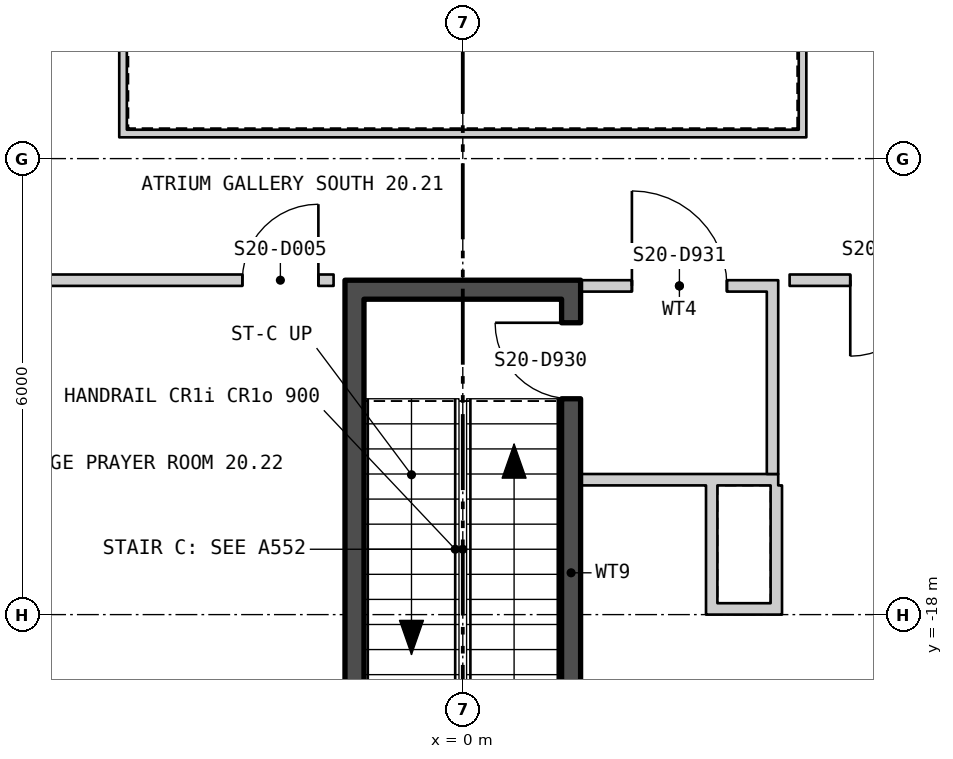
"""IFC4 building model, lengths in metres.
Left out: names, types, materials, properties, quantities, classifications, styles, units other than length and angle.
Written with IfcOpenShell. Run it as: python <this file> out.ifc"""

import sys

from ifc_helpers import new_model, si_unit, direction, frame, frame_2d, origin, place, context, subcontext, project, spatial, polyline, rectangle, outline, extrude, element, fill, save


model = new_model("IFC4")
c1 = context("Model", 3, precision=1e-05, world=origin(), true_north=direction((0.0, 1.0)))
c2 = subcontext(c1, "Body", "Model", "MODEL_VIEW")
j1 = project(units=[si_unit("LENGTHUNIT", "METRE"), si_unit("PLANEANGLEUNIT", "RADIAN")], contexts=[c1])
p1 = place(None, origin())
s1 = spatial("IfcSite", under=j1, at=p1, CompositionType="ELEMENT")
p2 = place(p1, origin())
s2 = spatial("IfcBuilding", under=s1, at=p2, CompositionType="ELEMENT")
p3 = place(p2, frame((0.0, 0.0, 268.8)))
s3 = spatial("IfcBuildingStorey", under=s2, at=p3, CompositionType="ELEMENT", Elevation=268.8)
p4 = place(p3, frame((-25.54, 15.35, -0.18), z_axis=(0.0, 0.0, 1.0), x_axis=(0.499999764979, -0.866025539474, 0.0)))
e1 = element("IfcWall", 1, at=p4, inside=s3, PredefinedType="SOLIDWALL", context=c2, shape_type="SweptSolid", body=[
    extrude(outline(polyline([(-0.13, -0.225), (45.87, -0.225), (45.61, 0.225), (0.13, 0.225), (-0.13, -0.225)])), origin(), (0.0, 0.0, 1.0), 3.68),
])
p5 = place(p4, frame((1.424, 0.0, 1.08)))
e2 = element("IfcOpeningElement", 2, at=p5, cuts=e1, PredefinedType="OPENING", context=c2, shape_type="SweptSolid", body=[
    extrude(rectangle(XDim=2.4, YDim=2.0, at=frame_2d((1.2, 1.0))), frame((0.0, 0.235, 0.0), z_axis=(0.0, -1.0, 0.0), x_axis=(1.0, 0.0, 0.0)), (0.0, 0.0, 1.0), 0.47),
])
p6 = place(p4, frame((5.893, 0.0, 1.08)))
e3 = element("IfcOpeningElement", 3, at=p6, cuts=e1, PredefinedType="OPENING", context=c2, shape_type="SweptSolid", body=[
    extrude(rectangle(XDim=2.4, YDim=2.0, at=frame_2d((1.2, 1.0))), frame((0.0, 0.235, 0.0), z_axis=(0.0, -1.0, 0.0), x_axis=(1.0, 0.0, 0.0)), (0.0, 0.0, 1.0), 0.47),
])
p7 = place(p4, frame((10.401, 0.0, 1.08)))
e4 = element("IfcOpeningElement", 4, at=p7, cuts=e1, PredefinedType="OPENING", context=c2, shape_type="SweptSolid", body=[
    extrude(rectangle(XDim=2.4, YDim=2.0, at=frame_2d((1.2, 1.0))), frame((0.0, 0.235, 0.0), z_axis=(0.0, -1.0, 0.0), x_axis=(1.0, 0.0, 0.0)), (0.0, 0.0, 1.0), 0.47),
])
p8 = place(p4, frame((14.909, 0.0, 1.08)))
e5 = element("IfcOpeningElement", 5, at=p8, cuts=e1, PredefinedType="OPENING", context=c2, shape_type="SweptSolid", body=[
    extrude(rectangle(XDim=2.4, YDim=2.0, at=frame_2d((1.2, 1.0))), frame((0.0, 0.235, 0.0), z_axis=(0.0, -1.0, 0.0), x_axis=(1.0, 0.0, 0.0)), (0.0, 0.0, 1.0), 0.47),
])
p9 = place(p4, frame((19.416, 0.0, 1.08)))
e6 = element("IfcOpeningElement", 6, at=p9, cuts=e1, PredefinedType="OPENING", context=c2, shape_type="SweptSolid", body=[
    extrude(rectangle(XDim=2.4, YDim=2.0, at=frame_2d((1.2, 1.0))), frame((0.0, 0.235, 0.0), z_axis=(0.0, -1.0, 0.0), x_axis=(1.0, 0.0, 0.0)), (0.0, 0.0, 1.0), 0.47),
])
p10 = place(p4, frame((23.924, 0.0, 1.08)))
e7 = element("IfcOpeningElement", 7, at=p10, cuts=e1, PredefinedType="OPENING", context=c2, shape_type="SweptSolid", body=[
    extrude(rectangle(XDim=2.4, YDim=2.0, at=frame_2d((1.2, 1.0))), frame((0.0, 0.235, 0.0), z_axis=(0.0, -1.0, 0.0), x_axis=(1.0, 0.0, 0.0)), (0.0, 0.0, 1.0), 0.47),
])
p11 = place(p4, frame((28.431, 0.0, 1.08)))
e8 = element("IfcOpeningElement", 8, at=p11, cuts=e1, PredefinedType="OPENING", context=c2, shape_type="SweptSolid", body=[
    extrude(rectangle(XDim=2.4, YDim=2.0, at=frame_2d((1.2, 1.0))), frame((0.0, 0.235, 0.0), z_axis=(0.0, -1.0, 0.0), x_axis=(1.0, 0.0, 0.0)), (0.0, 0.0, 1.0), 0.47),
])
p12 = place(p4, frame((32.939, 0.0, 1.08)))
e9 = element("IfcOpeningElement", 9, at=p12, cuts=e1, PredefinedType="OPENING", context=c2, shape_type="SweptSolid", body=[
    extrude(rectangle(XDim=2.4, YDim=2.0, at=frame_2d((1.2, 1.0))), frame((0.0, 0.235, 0.0), z_axis=(0.0, -1.0, 0.0), x_axis=(1.0, 0.0, 0.0)), (0.0, 0.0, 1.0), 0.47),
])
p13 = place(p4, frame((37.447, 0.0, 1.08)))
e10 = element("IfcOpeningElement", 10, at=p13, cuts=e1, PredefinedType="OPENING", context=c2, shape_type="SweptSolid", body=[
    extrude(rectangle(XDim=2.4, YDim=2.0, at=frame_2d((1.2, 1.0))), frame((0.0, 0.235, 0.0), z_axis=(0.0, -1.0, 0.0), x_axis=(1.0, 0.0, 0.0)), (0.0, 0.0, 1.0), 0.47),
])
p14 = place(p4, frame((41.916, 0.0, 1.08)))
e11 = element("IfcOpeningElement", 11, at=p14, cuts=e1, PredefinedType="OPENING", context=c2, shape_type="SweptSolid", body=[
    extrude(rectangle(XDim=2.4, YDim=2.0, at=frame_2d((1.2, 1.0))), frame((0.0, 0.235, 0.0), z_axis=(0.0, -1.0, 0.0), x_axis=(1.0, 0.0, 0.0)), (0.0, 0.0, 1.0), 0.47),
])
p15 = place(p3, frame((2.67, -24.262, -0.18), z_axis=(0.0, 0.0, 1.0), x_axis=(0.499999764979, 0.866025539474, 0.0)))
e12 = element("IfcWall", 12, at=p15, inside=s3, PredefinedType="SOLIDWALL", context=c2, shape_type="SweptSolid", body=[
    extrude(outline(polyline([(-0.13, -0.225), (45.87, -0.225), (45.61, 0.225), (0.13, 0.225), (-0.13, -0.225)])), origin(), (0.0, 0.0, 1.0), 3.68),
])
p16 = place(p15, frame((1.424, 0.0, 1.08)))
e13 = element("IfcOpeningElement", 13, at=p16, cuts=e12, PredefinedType="OPENING", context=c2, shape_type="SweptSolid", body=[
    extrude(rectangle(XDim=2.4, YDim=2.0, at=frame_2d((1.2, 1.0))), frame((0.0, 0.235, 0.0), z_axis=(0.0, -1.0, 0.0), x_axis=(1.0, 0.0, 0.0)), (0.0, 0.0, 1.0), 0.47),
])
p17 = place(p15, frame((5.893, 0.0, 1.08)))
e14 = element("IfcOpeningElement", 14, at=p17, cuts=e12, PredefinedType="OPENING", context=c2, shape_type="SweptSolid", body=[
    extrude(rectangle(XDim=2.4, YDim=2.0, at=frame_2d((1.2, 1.0))), frame((0.0, 0.235, 0.0), z_axis=(0.0, -1.0, 0.0), x_axis=(1.0, 0.0, 0.0)), (0.0, 0.0, 1.0), 0.47),
])
p18 = place(p15, frame((10.401, 0.0, 1.08)))
e15 = element("IfcOpeningElement", 15, at=p18, cuts=e12, PredefinedType="OPENING", context=c2, shape_type="SweptSolid", body=[
    extrude(rectangle(XDim=2.4, YDim=2.0, at=frame_2d((1.2, 1.0))), frame((0.0, 0.235, 0.0), z_axis=(0.0, -1.0, 0.0), x_axis=(1.0, 0.0, 0.0)), (0.0, 0.0, 1.0), 0.47),
])
p19 = place(p15, frame((14.909, 0.0, 1.08)))
e16 = element("IfcOpeningElement", 16, at=p19, cuts=e12, PredefinedType="OPENING", context=c2, shape_type="SweptSolid", body=[
    extrude(rectangle(XDim=2.4, YDim=2.0, at=frame_2d((1.2, 1.0))), frame((0.0, 0.235, 0.0), z_axis=(0.0, -1.0, 0.0), x_axis=(1.0, 0.0, 0.0)), (0.0, 0.0, 1.0), 0.47),
])
p20 = place(p15, frame((23.924, 0.0, 1.08)))
e17 = element("IfcOpeningElement", 17, at=p20, cuts=e12, PredefinedType="OPENING", context=c2, shape_type="SweptSolid", body=[
    extrude(rectangle(XDim=2.4, YDim=2.0, at=frame_2d((1.2, 1.0))), frame((0.0, 0.235, 0.0), z_axis=(0.0, -1.0, 0.0), x_axis=(1.0, 0.0, 0.0)), (0.0, 0.0, 1.0), 0.47),
])
p21 = place(p15, frame((28.431, 0.0, 1.08)))
e18 = element("IfcOpeningElement", 18, at=p21, cuts=e12, PredefinedType="OPENING", context=c2, shape_type="SweptSolid", body=[
    extrude(rectangle(XDim=2.4, YDim=2.0, at=frame_2d((1.2, 1.0))), frame((0.0, 0.235, 0.0), z_axis=(0.0, -1.0, 0.0), x_axis=(1.0, 0.0, 0.0)), (0.0, 0.0, 1.0), 0.47),
])
p22 = place(p15, frame((32.939, 0.0, 1.08)))
e19 = element("IfcOpeningElement", 19, at=p22, cuts=e12, PredefinedType="OPENING", context=c2, shape_type="SweptSolid", body=[
    extrude(rectangle(XDim=2.4, YDim=2.0, at=frame_2d((1.2, 1.0))), frame((0.0, 0.235, 0.0), z_axis=(0.0, -1.0, 0.0), x_axis=(1.0, 0.0, 0.0)), (0.0, 0.0, 1.0), 0.47),
])
p23 = place(p15, frame((37.447, 0.0, 1.08)))
e20 = element("IfcOpeningElement", 20, at=p23, cuts=e12, PredefinedType="OPENING", context=c2, shape_type="SweptSolid", body=[
    extrude(rectangle(XDim=2.4, YDim=2.0, at=frame_2d((1.2, 1.0))), frame((0.0, 0.235, 0.0), z_axis=(0.0, -1.0, 0.0), x_axis=(1.0, 0.0, 0.0)), (0.0, 0.0, 1.0), 0.47),
])
p24 = place(p15, frame((41.916, 0.0, 1.08)))
e21 = element("IfcOpeningElement", 21, at=p24, cuts=e12, PredefinedType="OPENING", context=c2, shape_type="SweptSolid", body=[
    extrude(rectangle(XDim=2.4, YDim=2.0, at=frame_2d((1.2, 1.0))), frame((0.0, 0.235, 0.0), z_axis=(0.0, -1.0, 0.0), x_axis=(1.0, 0.0, 0.0)), (0.0, 0.0, 1.0), 0.47),
])
p25 = place(p3, frame((-4.52, -11.67, 0.0), z_axis=(0.0, 0.0, 1.0), x_axis=(1.0, 0.0, 0.0)))
e22 = element("IfcWall", 22, at=p25, inside=s3, PredefinedType="PARTITIONING", context=c2, shape_type="SweptSolid", body=[
    extrude(rectangle(XDim=9.04, YDim=0.1, at=frame_2d((4.52, 0.0))), origin(), (0.0, 0.0, 1.0), 3.7),
])
for number, where, z_axis, x_axis in (
    (23, (4.47, -11.62, 0.0), (0.0, 0.0, 1.0), (0.0, 1.0, 0.0)),
    (24, (-4.47, -3.58, 0.0), (0.0, 0.0, 1.0), (0.0, -1.0, 0.0)),
):
    element("IfcWall", number, at=place(p3, frame(where, z_axis=z_axis, x_axis=x_axis)), inside=s3, PredefinedType="PARTITIONING", context=c2, shape_type="SweptSolid", body=[
        extrude(rectangle(XDim=8.04, YDim=0.1, at=frame_2d((4.02, 0.0))), origin(), (0.0, 0.0, 1.0), 3.7),
    ])
p26 = place(p3, frame((-1.425, -21.05, 0.0), z_axis=(0.0, 0.0, 1.0), x_axis=(0.0, 1.0, 0.0)))
e25 = element("IfcWall", 25, at=p26, inside=s3, PredefinedType="SHEAR", context=c2, shape_type="SweptSolid", body=[
    extrude(rectangle(XDim=7.2, YDim=0.25, at=frame_2d((3.6, 0.0))), origin(), (0.0, 0.0, 1.0), 3.7),
])
p27 = place(p3, frame((1.425, -21.05, 0.0), z_axis=(0.0, 0.0, 1.0), x_axis=(0.0, 1.0, 0.0)))
e26 = element("IfcWall", 26, at=p27, inside=s3, PredefinedType="SHEAR", context=c2, shape_type="SweptSolid", body=[
    extrude(rectangle(XDim=7.2, YDim=0.25, at=frame_2d((3.6, 0.0))), origin(), (0.0, 0.0, 1.0), 3.7),
])
p28 = place(p27, frame((5.89, 0.0, 0.0)))
e27 = element("IfcOpeningElement", 27, at=p28, cuts=e26, PredefinedType="OPENING", context=c2, shape_type="SweptSolid", body=[
    extrude(rectangle(XDim=1.0, YDim=2.1, at=frame_2d((0.5, 1.05))), frame((0.0, 0.135, 0.0), z_axis=(0.0, -1.0, 0.0), x_axis=(1.0, 0.0, 0.0)), (0.0, 0.0, 1.0), 0.27),
])
p29 = place(p3, frame((-1.55, -13.725, 0.0), z_axis=(0.0, 0.0, 1.0), x_axis=(1.0, 0.0, 0.0)))
e28 = element("IfcWall", 28, at=p29, inside=s3, PredefinedType="SHEAR", context=c2, shape_type="SweptSolid", body=[
    extrude(rectangle(XDim=3.1, YDim=0.25, at=frame_2d((1.55, 0.0))), origin(), (0.0, 0.0, 1.0), 3.7),
])
p30 = place(p3, frame((1.55, -16.225, 0.0), z_axis=(0.0, 0.0, 1.0), x_axis=(1.0, 0.0, 0.0)))
e29 = element("IfcWall", 29, at=p30, inside=s3, PredefinedType="PARTITIONING", context=c2, shape_type="SweptSolid", body=[
    extrude(rectangle(XDim=2.6, YDim=0.15, at=frame_2d((1.3, 0.0))), origin(), (0.0, 0.0, 1.0), 3.7),
])
p31 = place(p3, frame((4.075, -16.15, 0.0), z_axis=(0.0, 0.0, 1.0), x_axis=(0.0, 1.0, 0.0)))
e30 = element("IfcWall", 30, at=p31, inside=s3, PredefinedType="PARTITIONING", context=c2, shape_type="SweptSolid", body=[
    extrude(rectangle(XDim=2.4, YDim=0.15, at=frame_2d((1.2, 0.0))), origin(), (0.0, 0.0, 1.0), 3.7),
])
p32 = place(p3, frame((1.55, -13.675, 0.0), z_axis=(0.0, 0.0, 1.0), x_axis=(1.0, 0.0, 0.0)))
e31 = element("IfcWall", 31, at=p32, inside=s3, PredefinedType="PARTITIONING", context=c2, shape_type="SweptSolid", body=[
    extrude(rectangle(XDim=2.6, YDim=0.15, at=frame_2d((1.3, 0.0))), origin(), (0.0, 0.0, 1.0), 2.79),
])
p33 = place(p32, frame((0.675, 0.0, 0.0)))
e32 = element("IfcOpeningElement", 32, at=p33, cuts=e31, PredefinedType="OPENING", context=c2, shape_type="SweptSolid", body=[
    extrude(rectangle(XDim=1.25, YDim=2.1, at=frame_2d((0.625, 1.05))), frame((0.0, 0.085, 0.0), z_axis=(0.0, -1.0, 0.0), x_axis=(1.0, 0.0, 0.0)), (0.0, 0.0, 1.0), 0.17),
])
p34 = place(p3, frame((3.275, -18.0, 0.0), z_axis=(0.0, 0.0, 1.0), x_axis=(0.0, 1.0, 0.0)))
e33 = element("IfcWall", 33, at=p34, inside=s3, PredefinedType="PARTITIONING", context=c2, shape_type="SweptSolid", body=[
    extrude(rectangle(XDim=1.7, YDim=0.15, at=frame_2d((0.85, 0.0))), origin(), (0.0, 0.0, 1.0), 3.2),
])
p35 = place(p3, frame((3.35, -17.925, 0.0), z_axis=(0.0, 0.0, 1.0), x_axis=(1.0, 0.0, 0.0)))
e34 = element("IfcWall", 34, at=p35, inside=s3, PredefinedType="PARTITIONING", context=c2, shape_type="SweptSolid", body=[
    extrude(rectangle(XDim=0.7, YDim=0.15, at=frame_2d((0.35, 0.0))), origin(), (0.0, 0.0, 1.0), 3.7),
])
p36 = place(p3, frame((4.125, -18.0, 0.0), z_axis=(0.0, 0.0, 1.0), x_axis=(0.0, 1.0, 0.0)))
e35 = element("IfcWall", 35, at=p36, inside=s3, PredefinedType="PARTITIONING", context=c2, shape_type="SweptSolid", body=[
    extrude(rectangle(XDim=1.7, YDim=0.15, at=frame_2d((0.85, 0.0))), origin(), (0.0, 0.0, 1.0), 3.7),
])
p37 = place(p3, frame((-7.725, -13.6, 0.0), z_axis=(0.0, 0.0, 1.0), x_axis=(1.0, 0.0, 0.0)))
e36 = element("IfcWall", 36, at=p37, inside=s3, PredefinedType="PARTITIONING", context=c2, shape_type="SweptSolid", body=[
    extrude(rectangle(XDim=6.025, YDim=0.15, at=frame_2d((3.013, 0.0))), origin(), (0.0, 0.0, 1.0), 2.79),
])
p38 = place(p37, frame((4.825, 0.0, 0.0)))
e37 = element("IfcOpeningElement", 37, at=p38, cuts=e36, PredefinedType="OPENING", context=c2, shape_type="SweptSolid", body=[
    extrude(rectangle(XDim=1.0, YDim=2.1, at=frame_2d((0.5, 1.05))), frame((0.0, 0.085, 0.0), z_axis=(0.0, -1.0, 0.0), x_axis=(1.0, 0.0, 0.0)), (0.0, 0.0, 1.0), 0.17),
])
p39 = place(p3, frame((4.3, -13.6, 0.0), z_axis=(0.0, 0.0, 1.0), x_axis=(1.0, 0.0, 0.0)))
e38 = element("IfcWall", 38, at=p39, inside=s3, PredefinedType="PARTITIONING", context=c2, shape_type="SweptSolid", body=[
    extrude(rectangle(XDim=3.425, YDim=0.15, at=frame_2d((1.712, 0.0))), origin(), (0.0, 0.0, 1.0), 2.79),
])
p40 = place(p39, frame((0.798, 0.0, 0.0)))
e39 = element("IfcOpeningElement", 39, at=p40, cuts=e38, PredefinedType="OPENING", context=c2, shape_type="SweptSolid", body=[
    extrude(rectangle(XDim=1.0, YDim=2.1, at=frame_2d((0.5, 1.05))), frame((0.0, 0.085, 0.0), z_axis=(0.0, -1.0, 0.0), x_axis=(1.0, 0.0, 0.0)), (0.0, 0.0, 1.0), 0.17),
])
p41 = place(p28, origin())
e40 = element("IfcDoor", 40, at=p41, inside=s3, OperationType="SINGLE_SWING_LEFT", PredefinedType="DOOR", context=c2, shape_type="SweptSolid", body=[
    extrude(rectangle(XDim=1.0, YDim=2.1, at=frame_2d((0.5, 1.05))), frame((0.0, 0.025, 0.0), z_axis=(0.0, -1.0, 0.0), x_axis=(1.0, 0.0, 0.0)), (0.0, 0.0, 1.0), 0.05),
])
fill(e27, e40)
p42 = place(p33, origin())
e41 = element("IfcDoor", 41, at=p42, inside=s3, OperationType="SINGLE_SWING_RIGHT", PredefinedType="DOOR", context=c2, shape_type="SweptSolid", body=[
    extrude(rectangle(XDim=1.25, YDim=2.1, at=frame_2d((0.625, 1.05))), frame((0.0, 0.025, 0.0), z_axis=(0.0, -1.0, 0.0), x_axis=(1.0, 0.0, 0.0)), (0.0, 0.0, 1.0), 0.05),
])
fill(e32, e41)
p43 = place(p38, origin())
e42 = element("IfcDoor", 42, at=p43, inside=s3, OperationType="SINGLE_SWING_LEFT", PredefinedType="DOOR", context=c2, shape_type="SweptSolid", body=[
    extrude(rectangle(XDim=1.0, YDim=2.1, at=frame_2d((0.5, 1.05))), frame((0.0, 0.025, 0.0), z_axis=(0.0, -1.0, 0.0), x_axis=(1.0, 0.0, 0.0)), (0.0, 0.0, 1.0), 0.05),
])
fill(e37, e42)
p44 = place(p40, origin())
e43 = element("IfcDoor", 43, at=p44, inside=s3, OperationType="SINGLE_SWING_LEFT", PredefinedType="DOOR", context=c2, shape_type="SweptSolid", body=[
    extrude(rectangle(XDim=1.0, YDim=2.1, at=frame_2d((0.5, 1.05))), frame((0.0, 0.025, 0.0), z_axis=(0.0, -1.0, 0.0), x_axis=(1.0, 0.0, 0.0)), (0.0, 0.0, 1.0), 0.05),
])
fill(e39, e43)
save(model, sys.argv[1])
